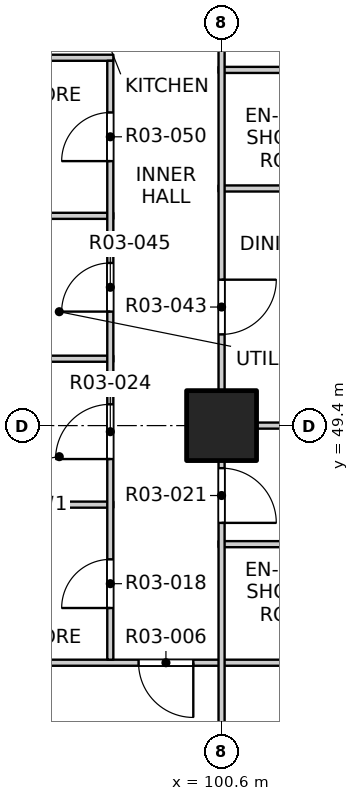
"""IFC4 building model, lengths in metres.
Left out: names, types, materials, properties, quantities, classifications, styles, units other than length and angle.
Written with IfcOpenShell. Run it as: python <this file> out.ifc"""

import sys

from ifc_helpers import new_model, si_unit, direction, frame, frame_2d, origin, origin_2d, place, context, subcontext, project, spatial, rectangle, extrude, element, fill, save


model = new_model("IFC4")
c1 = context("Model", 3, precision=1e-05, world=origin(), true_north=direction((0.0, 1.0)))
c2 = subcontext(c1, "Body", "Model", "MODEL_VIEW")
j1 = project(units=[si_unit("LENGTHUNIT", "METRE"), si_unit("PLANEANGLEUNIT", "RADIAN")], contexts=[c1])
p1 = place(None, origin())
s1 = spatial("IfcSite", under=j1, at=p1, CompositionType="ELEMENT")
p2 = place(p1, origin())
s2 = spatial("IfcBuilding", under=s1, at=p2, CompositionType="ELEMENT")
p3 = place(p2, frame((0.0, 0.0, 39.9)))
s3 = spatial("IfcBuildingStorey", under=s2, at=p3, CompositionType="ELEMENT", Elevation=39.9)
p4 = place(p3, frame((100.6, 49.4, -0.25), z_axis=(0.0, 0.0, 1.0), x_axis=(1.0, 0.0, 0.0)))
e1 = element("IfcColumn", 1, at=p4, inside=s3, PredefinedType="COLUMN", context=c2, shape_type="SweptSolid", body=[
    extrude(rectangle(XDim=1.15, YDim=1.15, at=origin_2d()), origin(), (0.0, 0.0, 1.0), 3.4),
])
p5 = place(p3, frame((96.6, 45.5, 0.0), z_axis=(0.0, 0.0, 1.0), x_axis=(1.0, 0.0, 0.0)))
e2 = element("IfcWall", 2, at=p5, inside=s3, PredefinedType="PARTITIONING", context=c2, shape_type="SweptSolid", body=[
    extrude(rectangle(XDim=11.5, YDim=0.1, at=frame_2d((5.75, 0.0))), origin(), (0.0, 0.0, 1.0), 3.15),
])
p6 = place(p5, frame((2.635, 0.0, 0.0)))
e3 = element("IfcOpeningElement", 3, at=p6, cuts=e2, PredefinedType="OPENING", context=c2, shape_type="SweptSolid", body=[
    extrude(rectangle(XDim=0.9, YDim=2.1, at=frame_2d((0.45, 1.05))), frame((0.0, 0.06, 0.0), z_axis=(0.0, -1.0, 0.0), x_axis=(1.0, 0.0, 0.0)), (0.0, 0.0, 1.0), 0.12),
])
p7 = place(p3, frame((100.55, 47.45, 0.0), z_axis=(0.0, 0.0, 1.0), x_axis=(1.0, 0.0, 0.0)))
e4 = element("IfcWall", 4, at=p7, inside=s3, PredefinedType="PARTITIONING", context=c2, shape_type="SweptSolid", body=[
    extrude(rectangle(XDim=3.55, YDim=0.1, at=frame_2d((1.775, 0.0))), origin(), (0.0, 0.0, 1.0), 3.15),
])
p8 = place(p3, frame((96.6, 48.1, 0.0), z_axis=(0.0, 0.0, 1.0), x_axis=(1.0, 0.0, 0.0)))
e5 = element("IfcWall", 5, at=p8, inside=s3, PredefinedType="PARTITIONING", context=c2, shape_type="SweptSolid", body=[
    extrude(rectangle(XDim=2.22, YDim=0.1, at=frame_2d((1.11, 0.0))), origin(), (0.0, 0.0, 1.0), 3.15),
])
p9 = place(p3, frame((100.55, 49.4, 0.0), z_axis=(0.0, 0.0, 1.0), x_axis=(1.0, 0.0, 0.0)))
e6 = element("IfcWall", 6, at=p9, inside=s3, PredefinedType="PARTITIONING", context=c2, shape_type="SweptSolid", body=[
    extrude(rectangle(XDim=7.55, YDim=0.1, at=frame_2d((3.775, 0.0))), origin(), (0.0, 0.0, 1.0), 3.15),
])
for number, where, z_axis, x_axis in (
    (7, (96.6, 50.5, 0.0), (0.0, 0.0, 1.0), (1.0, 0.0, 0.0)),
    (8, (96.6, 52.85, 0.0), (0.0, 0.0, 1.0), (1.0, 0.0, 0.0)),
):
    element("IfcWall", number, at=place(p3, frame(where, z_axis=z_axis, x_axis=x_axis)), inside=s3, PredefinedType="PARTITIONING", context=c2, shape_type="SweptSolid", body=[
        extrude(rectangle(XDim=2.22, YDim=0.1, at=frame_2d((1.11, 0.0))), origin(), (0.0, 0.0, 1.0), 3.15),
    ])
p10 = place(p3, frame((100.55, 53.3, 0.0), z_axis=(0.0, 0.0, 1.0), x_axis=(1.0, 0.0, 0.0)))
e9 = element("IfcWall", 9, at=p10, inside=s3, PredefinedType="PARTITIONING", context=c2, shape_type="SweptSolid", body=[
    extrude(rectangle(XDim=7.55, YDim=0.1, at=frame_2d((3.775, 0.0))), origin(), (0.0, 0.0, 1.0), 3.15),
])
p11 = place(p3, frame((100.55, 55.25, 0.0), z_axis=(0.0, 0.0, 1.0), x_axis=(1.0, 0.0, 0.0)))
e10 = element("IfcWall", 10, at=p11, inside=s3, PredefinedType="PARTITIONING", context=c2, shape_type="SweptSolid", body=[
    extrude(rectangle(XDim=3.55, YDim=0.1, at=frame_2d((1.775, 0.0))), origin(), (0.0, 0.0, 1.0), 3.15),
])
p12 = place(p3, frame((96.6, 55.45, 0.0), z_axis=(0.0, 0.0, 1.0), x_axis=(1.0, 0.0, 0.0)))
e11 = element("IfcWall", 11, at=p12, inside=s3, PredefinedType="PARTITIONING", context=c2, shape_type="SweptSolid", body=[
    extrude(rectangle(XDim=2.22, YDim=0.1, at=frame_2d((1.11, 0.0))), origin(), (0.0, 0.0, 1.0), 3.15),
])
p13 = place(p3, frame((98.77, 45.55, 0.0), z_axis=(0.0, 0.0, 1.0), x_axis=(0.0, 1.0, 0.0)))
e12 = element("IfcWall", 12, at=p13, inside=s3, PredefinedType="PARTITIONING", context=c2, shape_type="SweptSolid", body=[
    extrude(rectangle(XDim=9.85, YDim=0.1, at=frame_2d((4.925, 0.0))), origin(), (0.0, 0.0, 1.0), 3.15),
])
p14 = place(p13, frame((0.85, 0.0, 0.0)))
e13 = element("IfcOpeningElement", 13, at=p14, cuts=e12, PredefinedType="OPENING", context=c2, shape_type="SweptSolid", body=[
    extrude(rectangle(XDim=0.8, YDim=2.1, at=frame_2d((0.4, 1.05))), frame((0.0, 0.06, 0.0), z_axis=(0.0, -1.0, 0.0), x_axis=(1.0, 0.0, 0.0)), (0.0, 0.0, 1.0), 0.12),
])
p15 = place(p13, frame((3.3, 0.0, 0.0)))
e14 = element("IfcOpeningElement", 14, at=p15, cuts=e12, PredefinedType="OPENING", context=c2, shape_type="SweptSolid", body=[
    extrude(rectangle(XDim=0.9, YDim=2.1, at=frame_2d((0.45, 1.05))), frame((0.0, 0.06, 0.0), z_axis=(0.0, -1.0, 0.0), x_axis=(1.0, 0.0, 0.0)), (0.0, 0.0, 1.0), 0.12),
])
p16 = place(p13, frame((5.725, 0.0, 0.0)))
e15 = element("IfcOpeningElement", 15, at=p16, cuts=e12, PredefinedType="OPENING", context=c2, shape_type="SweptSolid", body=[
    extrude(rectangle(XDim=0.8, YDim=2.1, at=frame_2d((0.4, 1.05))), frame((0.0, 0.06, 0.0), z_axis=(0.0, -1.0, 0.0), x_axis=(1.0, 0.0, 0.0)), (0.0, 0.0, 1.0), 0.12),
])
p17 = place(p13, frame((8.2, 0.0, 0.0)))
e16 = element("IfcOpeningElement", 16, at=p17, cuts=e12, PredefinedType="OPENING", context=c2, shape_type="SweptSolid", body=[
    extrude(rectangle(XDim=0.8, YDim=2.1, at=frame_2d((0.4, 1.05))), frame((0.0, 0.06, 0.0), z_axis=(0.0, -1.0, 0.0), x_axis=(1.0, 0.0, 0.0)), (0.0, 0.0, 1.0), 0.12),
])
p18 = place(p3, frame((100.6, 41.9, 0.0), z_axis=(0.0, 0.0, 1.0), x_axis=(0.0, 1.0, 0.0)))
e17 = element("IfcWall", 17, at=p18, inside=s3, PredefinedType="PARTITIONING", context=c2, shape_type="SweptSolid", body=[
    extrude(rectangle(XDim=7.5, YDim=0.1, at=frame_2d((3.75, 0.0))), origin(), (0.0, 0.0, 1.0), 2.55),
])
p19 = place(p18, frame((1.2, 0.0, 0.0)))
e18 = element("IfcOpeningElement", 18, at=p19, cuts=e17, PredefinedType="OPENING", context=c2, shape_type="SweptSolid", body=[
    extrude(rectangle(XDim=0.9, YDim=2.1, at=frame_2d((0.45, 1.05))), frame((0.0, 0.06, 0.0), z_axis=(0.0, -1.0, 0.0), x_axis=(1.0, 0.0, 0.0)), (0.0, 0.0, 1.0), 0.12),
])
p20 = place(p18, frame((5.9, 0.0, 0.0)))
e19 = element("IfcOpeningElement", 19, at=p20, cuts=e17, PredefinedType="OPENING", context=c2, shape_type="SweptSolid", body=[
    extrude(rectangle(XDim=0.9, YDim=2.1, at=frame_2d((0.45, 1.05))), frame((0.0, 0.06, 0.0), z_axis=(0.0, -1.0, 0.0), x_axis=(1.0, 0.0, 0.0)), (0.0, 0.0, 1.0), 0.12),
])
p21 = place(p3, frame((100.6, 49.4, 0.0), z_axis=(0.0, 0.0, 1.0), x_axis=(0.0, 1.0, 0.0)))
e20 = element("IfcWall", 20, at=p21, inside=s3, PredefinedType="PARTITIONING", context=c2, shape_type="SweptSolid", body=[
    extrude(rectangle(XDim=31.2, YDim=0.1, at=frame_2d((15.6, 0.0))), origin(), (0.0, 0.0, 1.0), 3.15),
])
p22 = place(p21, frame((1.5, 0.0, 0.0)))
e21 = element("IfcOpeningElement", 21, at=p22, cuts=e20, PredefinedType="OPENING", context=c2, shape_type="SweptSolid", body=[
    extrude(rectangle(XDim=0.9, YDim=2.1, at=frame_2d((0.45, 1.05))), frame((0.0, 0.06, 0.0), z_axis=(0.0, -1.0, 0.0), x_axis=(1.0, 0.0, 0.0)), (0.0, 0.0, 1.0), 0.12),
])
p23 = place(p21, frame((6.225, 0.0, 0.0)))
e22 = element("IfcOpeningElement", 22, at=p23, cuts=e20, PredefinedType="OPENING", context=c2, shape_type="SweptSolid", body=[
    extrude(rectangle(XDim=0.9, YDim=2.1, at=frame_2d((0.45, 1.05))), frame((0.0, 0.06, 0.0), z_axis=(0.0, -1.0, 0.0), x_axis=(1.0, 0.0, 0.0)), (0.0, 0.0, 1.0), 0.12),
])
p24 = place(p21, frame((10.275, 0.0, 0.0)))
e23 = element("IfcOpeningElement", 23, at=p24, cuts=e20, PredefinedType="OPENING", context=c2, shape_type="SweptSolid", body=[
    extrude(rectangle(XDim=0.9, YDim=2.1, at=frame_2d((0.45, 1.05))), frame((0.0, 0.06, 0.0), z_axis=(0.0, -1.0, 0.0), x_axis=(1.0, 0.0, 0.0)), (0.0, 0.0, 1.0), 0.12),
])
p25 = place(p21, frame((14.0, 0.0, 0.0)))
e24 = element("IfcOpeningElement", 24, at=p25, cuts=e20, PredefinedType="OPENING", context=c2, shape_type="SweptSolid", body=[
    extrude(rectangle(XDim=0.9, YDim=2.1, at=frame_2d((0.45, 1.05))), frame((0.0, 0.06, 0.0), z_axis=(0.0, -1.0, 0.0), x_axis=(1.0, 0.0, 0.0)), (0.0, 0.0, 1.0), 0.12),
])
p26 = place(p21, frame((17.1, 0.0, 0.0)))
e25 = element("IfcOpeningElement", 25, at=p26, cuts=e20, PredefinedType="OPENING", context=c2, shape_type="SweptSolid", body=[
    extrude(rectangle(XDim=0.9, YDim=2.1, at=frame_2d((0.45, 1.05))), frame((0.0, 0.06, 0.0), z_axis=(0.0, -1.0, 0.0), x_axis=(1.0, 0.0, 0.0)), (0.0, 0.0, 1.0), 0.12),
])
p27 = place(p21, frame((21.0, 0.0, 0.0)))
e26 = element("IfcOpeningElement", 26, at=p27, cuts=e20, PredefinedType="OPENING", context=c2, shape_type="SweptSolid", body=[
    extrude(rectangle(XDim=0.9, YDim=2.1, at=frame_2d((0.45, 1.05))), frame((0.0, 0.06, 0.0), z_axis=(0.0, -1.0, 0.0), x_axis=(1.0, 0.0, 0.0)), (0.0, 0.0, 1.0), 0.12),
])
p28 = place(p21, frame((25.875, 0.0, 0.0)))
e27 = element("IfcOpeningElement", 27, at=p28, cuts=e20, PredefinedType="OPENING", context=c2, shape_type="SweptSolid", body=[
    extrude(rectangle(XDim=0.9, YDim=2.1, at=frame_2d((0.45, 1.05))), frame((0.0, 0.06, 0.0), z_axis=(0.0, -1.0, 0.0), x_axis=(1.0, 0.0, 0.0)), (0.0, 0.0, 1.0), 0.12),
])
p29 = place(p21, frame((29.6, 0.0, 0.0)))
e28 = element("IfcOpeningElement", 28, at=p29, cuts=e20, PredefinedType="OPENING", context=c2, shape_type="SweptSolid", body=[
    extrude(rectangle(XDim=0.9, YDim=2.1, at=frame_2d((0.45, 1.05))), frame((0.0, 0.06, 0.0), z_axis=(0.0, -1.0, 0.0), x_axis=(1.0, 0.0, 0.0)), (0.0, 0.0, 1.0), 0.12),
])
p30 = place(p6, origin())
e29 = element("IfcDoor", 29, at=p30, inside=s3, OperationType="SINGLE_SWING_LEFT", PredefinedType="DOOR", context=c2, shape_type="SweptSolid", body=[
    extrude(rectangle(XDim=0.9, YDim=2.1, at=frame_2d((0.45, 1.05))), frame((0.0, 0.025, 0.0), z_axis=(0.0, -1.0, 0.0), x_axis=(1.0, 0.0, 0.0)), (0.0, 0.0, 1.0), 0.05),
])
fill(e3, e29)
p31 = place(p14, origin())
e30 = element("IfcDoor", 30, at=p31, inside=s3, OperationType="SINGLE_SWING_LEFT", PredefinedType="DOOR", context=c2, shape_type="SweptSolid", body=[
    extrude(rectangle(XDim=0.8, YDim=2.1, at=frame_2d((0.4, 1.05))), frame((0.0, 0.025, 0.0), z_axis=(0.0, -1.0, 0.0), x_axis=(1.0, 0.0, 0.0)), (0.0, 0.0, 1.0), 0.05),
])
fill(e13, e30)
p32 = place(p20, origin())
e31 = element("IfcDoor", 31, at=p32, inside=s3, OperationType="SINGLE_SWING_RIGHT", PredefinedType="DOOR", context=c2, shape_type="SweptSolid", body=[
    extrude(rectangle(XDim=0.9, YDim=2.1, at=frame_2d((0.45, 1.05))), frame((0.0, 0.025, 0.0), z_axis=(0.0, -1.0, 0.0), x_axis=(1.0, 0.0, 0.0)), (0.0, 0.0, 1.0), 0.05),
])
fill(e19, e31)
p33 = place(p15, origin())
e32 = element("IfcDoor", 32, at=p33, inside=s3, OperationType="SINGLE_SWING_LEFT", PredefinedType="DOOR", context=c2, shape_type="SweptSolid", body=[
    extrude(rectangle(XDim=0.9, YDim=2.1, at=frame_2d((0.45, 1.05))), frame((0.0, 0.025, 0.0), z_axis=(0.0, -1.0, 0.0), x_axis=(1.0, 0.0, 0.0)), (0.0, 0.0, 1.0), 0.05),
])
fill(e14, e32)
p34 = place(p22, origin())
e33 = element("IfcDoor", 33, at=p34, inside=s3, OperationType="SINGLE_SWING_LEFT", PredefinedType="DOOR", context=c2, shape_type="SweptSolid", body=[
    extrude(rectangle(XDim=0.9, YDim=2.1, at=frame_2d((0.45, 1.05))), frame((0.0, 0.025, 0.0), z_axis=(0.0, -1.0, 0.0), x_axis=(1.0, 0.0, 0.0)), (0.0, 0.0, 1.0), 0.05),
])
fill(e21, e33)
p35 = place(p16, origin())
e34 = element("IfcDoor", 34, at=p35, inside=s3, OperationType="SINGLE_SWING_LEFT", PredefinedType="DOOR", context=c2, shape_type="SweptSolid", body=[
    extrude(rectangle(XDim=0.8, YDim=2.1, at=frame_2d((0.4, 1.05))), frame((0.0, 0.025, 0.0), z_axis=(0.0, -1.0, 0.0), x_axis=(1.0, 0.0, 0.0)), (0.0, 0.0, 1.0), 0.05),
])
fill(e15, e34)
p36 = place(p17, origin())
e35 = element("IfcDoor", 35, at=p36, inside=s3, OperationType="SINGLE_SWING_LEFT", PredefinedType="DOOR", context=c2, shape_type="SweptSolid", body=[
    extrude(rectangle(XDim=0.8, YDim=2.1, at=frame_2d((0.4, 1.05))), frame((0.0, 0.025, 0.0), z_axis=(0.0, -1.0, 0.0), x_axis=(1.0, 0.0, 0.0)), (0.0, 0.0, 1.0), 0.05),
])
fill(e16, e35)
save(model, sys.argv[1])
